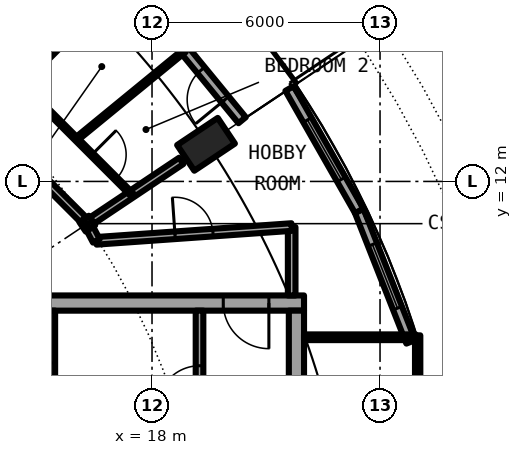
"""IFC4 building model, lengths in metres.
Left out: names, types, materials, properties, quantities, classifications, styles, units other than length and angle.
Written with IfcOpenShell. Run it as: python <this file> out.ifc"""

import sys

from ifc_helpers import new_model, si_unit, direction, frame, frame_2d, origin, origin_2d, place, context, subcontext, project, spatial, rectangle, hollow_circle, i_section, extrude, element, fill, save


model = new_model("IFC4")
c1 = context("Model", 3, precision=1e-05, world=origin(), true_north=direction((0.0, 1.0)))
c2 = subcontext(c1, "Body", "Model", "MODEL_VIEW")
j1 = project(units=[si_unit("LENGTHUNIT", "METRE"), si_unit("PLANEANGLEUNIT", "RADIAN")], contexts=[c1])
p1 = place(None, origin())
s1 = spatial("IfcSite", under=j1, at=p1, CompositionType="ELEMENT")
p2 = place(p1, origin())
s2 = spatial("IfcBuilding", under=s1, at=p2, CompositionType="ELEMENT")
p3 = place(p2, frame((0.0, 0.0, 246.25)))
s3 = spatial("IfcBuildingStorey", under=s2, at=p3, CompositionType="ELEMENT", Elevation=246.25)
p4 = place(p3, frame((19.955, 13.334, 0.0), z_axis=(-0.346819263352, -0.231767499499, 0.908845545043), x_axis=(0.555620411262, -0.831436082083, 0.0)))
e1 = element("IfcColumn", 1, at=p4, inside=s3, PredefinedType="COLUMN", context=c2, shape_type="SweptSolid", body=[
    extrude(hollow_circle(Radius=0.406, WallThickness=0.03, at=origin_2d()), origin(), (0.0, 0.0, 1.0), 3.081),
])
p5 = place(p3, frame((16.297, 10.889, 0.0), z_axis=(0.0, 0.0, 1.0), x_axis=(0.831469612303, 0.55557023302, 0.0)))
e2 = element("IfcColumn", 2, at=p5, inside=s3, PredefinedType="COLUMN", context=c2, shape_type="SweptSolid", body=[
    extrude(i_section(OverallWidth=0.3, OverallDepth=0.3, WebThickness=0.011, FlangeThickness=0.019, FilletRadius=0.027, at=origin_2d()), origin(), (0.0, 0.0, 1.0), 3.05),
])
p6 = place(p3, frame((20.371, 13.611, 0.0), z_axis=(0.0, 0.0, 1.0), x_axis=(-0.634396836208, 0.773007538262, 0.0)))
e3 = element("IfcWall", 3, at=p6, inside=s3, PredefinedType="SOLIDWALL", context=c2, shape_type="SweptSolid", body=[
    extrude(rectangle(XDim=4.803, YDim=0.25, at=frame_2d((2.402, 0.0))), origin(), (0.0, 0.0, 1.0), 2.7),
])
p7 = place(p6, frame((0.704, 0.0, 0.0)))
e4 = element("IfcOpeningElement", 4, at=p7, cuts=e3, PredefinedType="OPENING", context=c2, shape_type="SweptSolid", body=[
    extrude(rectangle(XDim=1.0, YDim=2.2, at=frame_2d((0.5, 1.1))), frame((0.0, 0.135, 0.0), z_axis=(0.0, -1.0, 0.0), x_axis=(1.0, 0.0, 0.0)), (0.0, 0.0, 1.0), 0.27),
])
p8 = place(p6, frame((2.699, 0.0, 0.3)))
e5 = element("IfcOpeningElement", 5, at=p8, cuts=e3, PredefinedType="OPENING", context=c2, shape_type="SweptSolid", body=[
    extrude(rectangle(XDim=1.8, YDim=2.1, at=frame_2d((0.9, 1.05))), frame((0.0, 0.135, 0.0), z_axis=(0.0, -1.0, 0.0), x_axis=(1.0, 0.0, 0.0)), (0.0, 0.0, 1.0), 0.27),
])
p9 = place(p3, frame((24.809, 7.779, 0.0), z_axis=(0.0, 0.0, 1.0), x_axis=(-0.366351636034, 0.930476479432, 0.0)))
e6 = element("IfcWall", 6, at=p9, inside=s3, PredefinedType="SOLIDWALL", context=c2, shape_type="SweptSolid", body=[
    extrude(rectangle(XDim=3.705, YDim=0.25, at=frame_2d((1.852, 0.0))), origin(), (0.0, 0.0, 1.0), 2.7),
])
p10 = place(p9, frame((0.952, 0.0, 0.3)))
e7 = element("IfcOpeningElement", 7, at=p10, cuts=e6, PredefinedType="OPENING", context=c2, shape_type="SweptSolid", body=[
    extrude(rectangle(XDim=1.8, YDim=2.1, at=frame_2d((0.9, 1.05))), frame((0.0, 0.135, 0.0), z_axis=(0.0, -1.0, 0.0), x_axis=(1.0, 0.0, 0.0)), (0.0, 0.0, 1.0), 0.27),
])
p11 = place(p3, frame((23.452, 11.226, 0.0), z_axis=(0.0, 0.0, 1.0), x_axis=(-0.495031435966, 0.868875064325, 0.0)))
e8 = element("IfcWall", 8, at=p11, inside=s3, PredefinedType="SOLIDWALL", context=c2, shape_type="SweptSolid", body=[
    extrude(rectangle(XDim=3.705, YDim=0.25, at=frame_2d((1.853, 0.0))), origin(), (0.0, 0.0, 1.0), 2.7),
])
p12 = place(p11, frame((0.952, 0.0, 0.3)))
e9 = element("IfcOpeningElement", 9, at=p12, cuts=e8, PredefinedType="OPENING", context=c2, shape_type="SweptSolid", body=[
    extrude(rectangle(XDim=1.8, YDim=2.1, at=frame_2d((0.9, 1.05))), frame((0.0, 0.135, 0.0), z_axis=(0.0, -1.0, 0.0), x_axis=(1.0, 0.0, 0.0)), (0.0, 0.0, 1.0), 0.27),
])
p13 = place(p3, frame((22.0, 8.8, 0.0), z_axis=(0.0, 0.0, 1.0), x_axis=(-1.0, 0.0, 0.0)))
e10 = element("IfcWall", 10, at=p13, inside=s3, PredefinedType="SHEAR", context=c2, shape_type="SweptSolid", body=[
    extrude(rectangle(XDim=13.4, YDim=0.4, at=frame_2d((6.7, 0.0))), origin(), (0.0, 0.0, 1.0), 3.05),
])
p14 = place(p13, frame((0.925, 0.0, 0.0)))
e11 = element("IfcOpeningElement", 11, at=p14, cuts=e10, PredefinedType="OPENING", context=c2, shape_type="SweptSolid", body=[
    extrude(rectangle(XDim=1.2, YDim=2.3, at=frame_2d((0.6, 1.15))), frame((0.0, 0.21, 0.0), z_axis=(0.0, -1.0, 0.0), x_axis=(1.0, 0.0, 0.0)), (0.0, 0.0, 1.0), 0.42),
])
p15 = place(p3, frame((21.8, 8.6, 0.0), z_axis=(0.0, 0.0, 1.0), x_axis=(0.0, -1.0, 0.0)))
e12 = element("IfcWall", 12, at=p15, inside=s3, PredefinedType="SHEAR", context=c2, shape_type="SweptSolid", body=[
    extrude(rectangle(XDim=17.2, YDim=0.4, at=frame_2d((8.6, 0.0))), origin(), (0.0, 0.0, 1.0), 3.05),
])
p16 = place(p15, frame((7.7, 0.0, 0.0)))
e13 = element("IfcOpeningElement", 13, at=p16, cuts=e12, PredefinedType="OPENING", context=c2, shape_type="SweptSolid", body=[
    extrude(rectangle(XDim=1.8, YDim=2.3, at=frame_2d((0.9, 1.15))), frame((0.0, 0.21, 0.0), z_axis=(0.0, -1.0, 0.0), x_axis=(1.0, 0.0, 0.0)), (0.0, 0.0, 1.0), 0.42),
])
p17 = place(p3, frame((15.325, 4.65, 0.0), z_axis=(0.0, 0.0, 1.0), x_axis=(0.0, 1.0, 0.0)))
e14 = element("IfcWall", 14, at=p17, inside=s3, PredefinedType="SHEAR", context=c2, shape_type="SweptSolid", body=[
    extrude(rectangle(XDim=3.95, YDim=0.25, at=frame_2d((1.975, 0.0))), origin(), (0.0, 0.0, 1.0), 3.05),
])
p18 = place(p17, frame((1.375, 0.0, 0.0)))
e15 = element("IfcOpeningElement", 15, at=p18, cuts=e14, PredefinedType="OPENING", context=c2, shape_type="SweptSolid", body=[
    extrude(rectangle(XDim=1.2, YDim=2.3, at=frame_2d((0.6, 1.15))), frame((0.0, 0.135, 0.0), z_axis=(0.0, -1.0, 0.0), x_axis=(1.0, 0.0, 0.0)), (0.0, 0.0, 1.0), 0.27),
])
p19 = place(p3, frame((19.25, 1.575, 0.0), z_axis=(0.0, 0.0, 1.0), x_axis=(0.0, 1.0, 0.0)))
e16 = element("IfcWall", 16, at=p19, inside=s3, PredefinedType="SOLIDWALL", context=c2, shape_type="SweptSolid", body=[
    extrude(rectangle(XDim=7.025, YDim=0.2, at=frame_2d((3.513, 0.0))), origin(), (0.0, 0.0, 1.0), 2.7),
])
p20 = place(p19, frame((4.475, 0.0, 0.0)))
e17 = element("IfcOpeningElement", 17, at=p20, cuts=e16, PredefinedType="OPENING", context=c2, shape_type="SweptSolid", body=[
    extrude(rectangle(XDim=1.1, YDim=2.3, at=frame_2d((0.55, 1.15))), frame((0.0, 0.11, 0.0), z_axis=(0.0, -1.0, 0.0), x_axis=(1.0, 0.0, 0.0)), (0.0, 0.0, 1.0), 0.22),
])
p21 = place(p3, frame((22.0, 7.9, 0.0), z_axis=(0.0, 0.0, 1.0), x_axis=(1.0, 0.0, 0.0)))
e18 = element("IfcWall", 18, at=p21, inside=s3, PredefinedType="PARTITIONING", context=c2, shape_type="SweptSolid", body=[
    extrude(rectangle(XDim=2.94, YDim=0.15, at=frame_2d((1.47, 0.0))), origin(), (0.0, 0.0, 1.0), 2.7),
])
p22 = place(p3, frame((25.0, -7.95, 0.0), z_axis=(0.0, 0.0, 1.0), x_axis=(0.0, 1.0, 0.0)))
e19 = element("IfcWall", 19, at=p22, inside=s3, PredefinedType="PARTITIONING", context=c2, shape_type="SweptSolid", body=[
    extrude(rectangle(XDim=15.9, YDim=0.12, at=frame_2d((7.95, 0.0))), origin(), (0.0, 0.0, 1.0), 2.7),
])
p23 = place(p22, frame((0.95, 0.0, 0.1)))
e20 = element("IfcOpeningElement", 20, at=p23, cuts=e19, PredefinedType="OPENING", context=c2, shape_type="SweptSolid", body=[
    extrude(rectangle(XDim=14.0, YDim=2.35, at=frame_2d((7.0, 1.175))), frame((0.0, 0.07, 0.0), z_axis=(0.0, -1.0, 0.0), x_axis=(1.0, 0.0, 0.0)), (0.0, 0.0, 1.0), 0.14),
])
p24 = place(p3, frame((21.675, 9.0, 0.0), z_axis=(0.0, 0.0, 1.0), x_axis=(0.0, 1.0, 0.0)))
e21 = element("IfcWall", 21, at=p24, inside=s3, PredefinedType="PARTITIONING", context=c2, shape_type="SweptSolid", body=[
    extrude(rectangle(XDim=1.8, YDim=0.2, at=frame_2d((0.9, 0.0))), origin(), (0.0, 0.0, 1.0), 2.7),
])
p25 = place(p3, frame((14.564, 14.564, 0.0), z_axis=(0.0, 0.0, 1.0), x_axis=(0.707106781187, 0.707106781187, 0.0)))
e22 = element("IfcWall", 22, at=p25, inside=s3, PredefinedType="PARTITIONING", context=c2, shape_type="SweptSolid", body=[
    extrude(rectangle(XDim=3.779, YDim=0.1, at=frame_2d((1.89, 0.0))), origin(), (0.0, 0.0, 1.0), 2.7),
])
p26 = place(p25, frame((1.439, 0.0, 0.0)))
e23 = element("IfcOpeningElement", 23, at=p26, cuts=e22, PredefinedType="OPENING", context=c2, shape_type="SweptSolid", body=[
    extrude(rectangle(XDim=0.9, YDim=2.3, at=frame_2d((0.45, 1.15))), frame((0.0, 0.06, 0.0), z_axis=(0.0, -1.0, 0.0), x_axis=(1.0, 0.0, 0.0)), (0.0, 0.0, 1.0), 0.12),
])
p27 = place(p3, frame((16.012, 13.115, 0.0), z_axis=(0.0, 0.0, 1.0), x_axis=(0.773640700514, 0.633624546958, 0.0)))
e24 = element("IfcWall", 24, at=p27, inside=s3, PredefinedType="PARTITIONING", context=c2, shape_type="SweptSolid", body=[
    extrude(rectangle(XDim=3.677, YDim=0.1, at=frame_2d((1.839, 0.0))), origin(), (0.0, 0.0, 1.0), 2.7),
])
p28 = place(p3, frame((16.422, 10.972, 0.0), z_axis=(0.0, 0.0, 1.0), x_axis=(0.83131782921, 0.555797325324, 0.0)))
e25 = element("IfcWall", 25, at=p28, inside=s3, PredefinedType="PARTITIONING", context=c2, shape_type="SweptSolid", body=[
    extrude(rectangle(XDim=2.823, YDim=0.2, at=frame_2d((1.412, 0.0))), origin(), (0.0, 0.0, 1.0), 2.7),
])
p29 = place(p3, frame((16.535, 10.437, 0.0), z_axis=(0.0, 0.0, 1.0), x_axis=(0.997515141784, 0.070452408845, 0.0)))
e26 = element("IfcWall", 26, at=p29, inside=s3, PredefinedType="PARTITIONING", context=c2, shape_type="SweptSolid", body=[
    extrude(rectangle(XDim=5.153, YDim=0.2, at=frame_2d((2.576, 0.0))), origin(), (0.0, 0.0, 1.0), 2.7),
])
p30 = place(p29, frame((2.076, 0.0, 0.0)))
e27 = element("IfcOpeningElement", 27, at=p30, cuts=e26, PredefinedType="OPENING", context=c2, shape_type="SweptSolid", body=[
    extrude(rectangle(XDim=1.0, YDim=2.3, at=frame_2d((0.5, 1.15))), frame((0.0, 0.11, 0.0), z_axis=(0.0, -1.0, 0.0), x_axis=(1.0, 0.0, 0.0)), (0.0, 0.0, 1.0), 0.22),
])
p31 = place(p3, frame((10.997, 16.189, 0.0), z_axis=(0.0, 0.0, 1.0), x_axis=(0.707106781187, -0.707106781187, 0.0)))
e28 = element("IfcWall", 28, at=p31, inside=s3, PredefinedType="PARTITIONING", context=c2, shape_type="SweptSolid", body=[
    extrude(rectangle(XDim=7.343, YDim=0.2, at=frame_2d((3.671, 0.0))), origin(), (0.0, 0.0, 1.0), 2.45),
])
p32 = place(p31, frame((4.127, 0.0, 0.0)))
e29 = element("IfcOpeningElement", 29, at=p32, cuts=e28, PredefinedType="OPENING", context=c2, shape_type="SweptSolid", body=[
    extrude(rectangle(XDim=1.0, YDim=2.3, at=frame_2d((0.5, 1.15))), frame((0.0, 0.11, 0.0), z_axis=(0.0, -1.0, 0.0), x_axis=(1.0, 0.0, 0.0)), (0.0, 0.0, 1.0), 0.22),
])
p33 = place(p3, frame((16.367, 10.756, 0.0), z_axis=(0.0, 0.0, 1.0), x_axis=(0.465802239822, -0.884888848035, 0.0)))
e30 = element("IfcWall", 30, at=p33, inside=s3, PredefinedType="PARTITIONING", context=c2, shape_type="SweptSolid", body=[
    extrude(rectangle(XDim=0.361, YDim=0.2, at=frame_2d((0.18, 0.0))), origin(), (0.0, 0.0, 1.0), 2.7),
])
p34 = place(p3, frame((14.563, 14.563, 0.0), z_axis=(0.0, 0.0, 1.0), x_axis=(0.70686919808, -0.707344284494, 0.0)))
e31 = element("IfcWall", 31, at=p34, inside=s3, PredefinedType="PARTITIONING", context=c2, shape_type="SweptSolid", body=[
    extrude(rectangle(XDim=4.111, YDim=0.1, at=frame_2d((2.056, 0.0))), origin(), (0.0, 0.0, 1.0), 2.7),
])
p35 = place(p34, frame((2.626, 0.0, 0.0)))
e32 = element("IfcOpeningElement", 32, at=p35, cuts=e31, PredefinedType="OPENING", context=c2, shape_type="SweptSolid", body=[
    extrude(rectangle(XDim=0.9, YDim=2.3, at=frame_2d((0.45, 1.15))), frame((0.0, 0.06, 0.0), z_axis=(0.0, -1.0, 0.0), x_axis=(1.0, 0.0, 0.0)), (0.0, 0.0, 1.0), 0.12),
])
p36 = place(p7, origin())
e33 = element("IfcDoor", 33, at=p36, inside=s3, OperationType="SINGLE_SWING_LEFT", PredefinedType="DOOR", context=c2, shape_type="SweptSolid", body=[
    extrude(rectangle(XDim=1.0, YDim=2.2, at=frame_2d((0.5, 1.1))), frame((0.0, 0.025, 0.0), z_axis=(0.0, -1.0, 0.0), x_axis=(1.0, 0.0, 0.0)), (0.0, 0.0, 1.0), 0.05),
])
fill(e4, e33)
p37 = place(p10, origin())
e34 = element("IfcWindow", 34, at=p37, inside=s3, PartitioningType="SINGLE_PANEL", PredefinedType="WINDOW", context=c2, shape_type="SweptSolid", body=[
    extrude(rectangle(XDim=1.8, YDim=2.1, at=frame_2d((0.9, 1.05))), frame((0.0, 0.03, 0.0), z_axis=(0.0, -1.0, 0.0), x_axis=(1.0, 0.0, 0.0)), (0.0, 0.0, 1.0), 0.06),
])
fill(e7, e34)
p38 = place(p12, origin())
e35 = element("IfcWindow", 35, at=p38, inside=s3, PartitioningType="SINGLE_PANEL", PredefinedType="WINDOW", context=c2, shape_type="SweptSolid", body=[
    extrude(rectangle(XDim=1.8, YDim=2.1, at=frame_2d((0.9, 1.05))), frame((0.0, 0.03, 0.0), z_axis=(0.0, -1.0, 0.0), x_axis=(1.0, 0.0, 0.0)), (0.0, 0.0, 1.0), 0.06),
])
fill(e9, e35)
p39 = place(p20, origin())
e36 = element("IfcDoor", 36, at=p39, inside=s3, OperationType="SINGLE_SWING_LEFT", PredefinedType="DOOR", context=c2, shape_type="SweptSolid", body=[
    extrude(rectangle(XDim=1.1, YDim=2.3, at=frame_2d((0.55, 1.15))), frame((0.0, 0.025, 0.0), z_axis=(0.0, -1.0, 0.0), x_axis=(1.0, 0.0, 0.0)), (0.0, 0.0, 1.0), 0.05),
])
fill(e17, e36)
p40 = place(p14, origin())
e37 = element("IfcDoor", 37, at=p40, inside=s3, OperationType="SINGLE_SWING_RIGHT", PredefinedType="DOOR", context=c2, shape_type="SweptSolid", body=[
    extrude(rectangle(XDim=1.2, YDim=2.3, at=frame_2d((0.6, 1.15))), frame((0.0, 0.025, 0.0), z_axis=(0.0, -1.0, 0.0), x_axis=(1.0, 0.0, 0.0)), (0.0, 0.0, 1.0), 0.05),
])
fill(e11, e37)
p41 = place(p23, origin())
e38 = element("IfcWindow", 38, at=p41, inside=s3, PartitioningType="SINGLE_PANEL", PredefinedType="WINDOW", context=c2, shape_type="SweptSolid", body=[
    extrude(rectangle(XDim=14.0, YDim=2.35, at=frame_2d((7.0, 1.175))), frame((0.0, 0.03, 0.0), z_axis=(0.0, -1.0, 0.0), x_axis=(1.0, 0.0, 0.0)), (0.0, 0.0, 1.0), 0.06),
])
fill(e20, e38)
p42 = place(p35, origin())
e39 = element("IfcDoor", 39, at=p42, inside=s3, OperationType="SINGLE_SWING_RIGHT", PredefinedType="DOOR", context=c2, shape_type="SweptSolid", body=[
    extrude(rectangle(XDim=0.9, YDim=2.3, at=frame_2d((0.45, 1.15))), frame((0.0, 0.025, 0.0), z_axis=(0.0, -1.0, 0.0), x_axis=(1.0, 0.0, 0.0)), (0.0, 0.0, 1.0), 0.05),
])
fill(e32, e39)
p43 = place(p30, origin())
e40 = element("IfcDoor", 40, at=p43, inside=s3, OperationType="SINGLE_SWING_LEFT", PredefinedType="DOOR", context=c2, shape_type="SweptSolid", body=[
    extrude(rectangle(XDim=1.0, YDim=2.3, at=frame_2d((0.5, 1.15))), frame((0.0, 0.025, 0.0), z_axis=(0.0, -1.0, 0.0), x_axis=(1.0, 0.0, 0.0)), (0.0, 0.0, 1.0), 0.05),
])
fill(e27, e40)
save(model, sys.argv[1])
